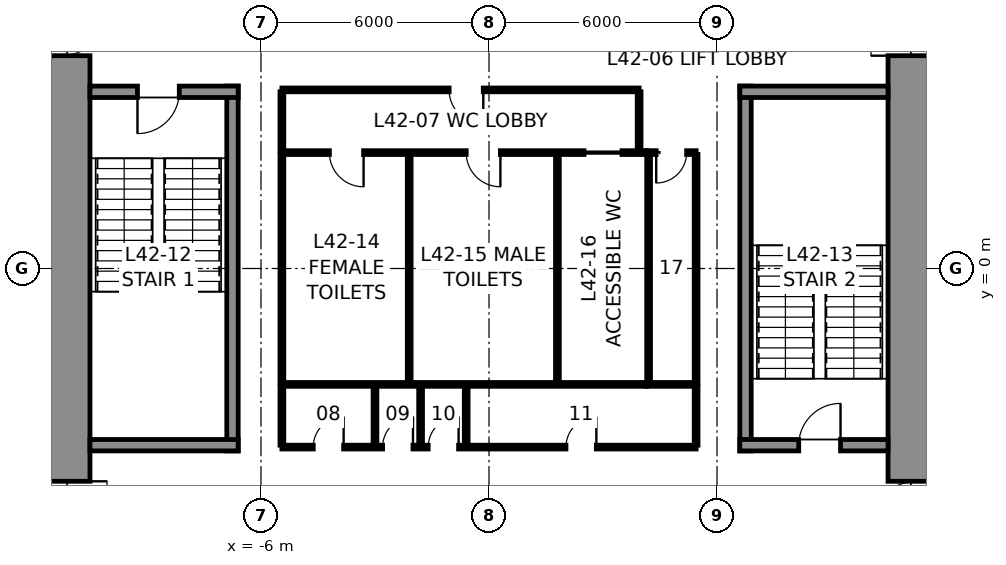
"""IFC4 building model, lengths in metres.
Left out: names, types, materials, properties, quantities, classifications, styles, units other than length and angle.
Written with IfcOpenShell. Run it as: python <this file> out.ifc"""

import sys

from ifc_helpers import new_model, si_unit, direction, frame, frame_2d, origin, place, context, subcontext, project, spatial, rectangle, extrude, element, fill, save


model = new_model("IFC4")
c1 = context("Model", 3, precision=1e-05, world=origin(), true_north=direction((0.0, 1.0)))
c2 = subcontext(c1, "Body", "Model", "MODEL_VIEW")
j1 = project(units=[si_unit("LENGTHUNIT", "METRE"), si_unit("PLANEANGLEUNIT", "RADIAN")], contexts=[c1])
p1 = place(None, origin())
s1 = spatial("IfcSite", under=j1, at=p1, CompositionType="ELEMENT")
p2 = place(p1, origin())
s2 = spatial("IfcBuilding", under=s1, at=p2, CompositionType="ELEMENT")
p3 = place(p2, frame((0.0, 0.0, 196.8)))
s3 = spatial("IfcBuildingStorey", under=s2, at=p3, CompositionType="ELEMENT", Elevation=196.8)
p4 = place(p3, frame((11.25, 10.5, 0.0), z_axis=(0.0, 0.0, 1.0), x_axis=(0.0, -1.0, 0.0)))
e1 = element("IfcWall", 1, at=p4, inside=s3, PredefinedType="SHEAR", context=c2, shape_type="SweptSolid", body=[
    extrude(rectangle(XDim=21.0, YDim=1.5, at=frame_2d((10.5, 0.0))), origin(), (0.0, 0.0, 1.0), 5.0),
])
p5 = place(p4, frame((3.7, 0.0, 0.0)))
e2 = element("IfcOpeningElement", 2, at=p5, cuts=e1, PredefinedType="OPENING", context=c2, shape_type="SweptSolid", body=[
    extrude(rectangle(XDim=1.2, YDim=2.3, at=frame_2d((0.6, 1.15))), frame((0.0, 0.76, 0.0), z_axis=(0.0, -1.0, 0.0), x_axis=(1.0, 0.0, 0.0)), (0.0, 0.0, 1.0), 1.52),
])
p6 = place(p4, frame((16.1, 0.0, 0.0)))
e3 = element("IfcOpeningElement", 3, at=p6, cuts=e1, PredefinedType="OPENING", context=c2, shape_type="SweptSolid", body=[
    extrude(rectangle(XDim=1.2, YDim=2.3, at=frame_2d((0.6, 1.15))), frame((0.0, 0.76, 0.0), z_axis=(0.0, -1.0, 0.0), x_axis=(1.0, 0.0, 0.0)), (0.0, 0.0, 1.0), 1.52),
])
p7 = place(p3, frame((-11.25, -10.5, 0.0), z_axis=(0.0, 0.0, 1.0), x_axis=(0.0, 1.0, 0.0)))
e4 = element("IfcWall", 4, at=p7, inside=s3, PredefinedType="SHEAR", context=c2, shape_type="SweptSolid", body=[
    extrude(rectangle(XDim=21.0, YDim=1.5, at=frame_2d((10.5, 0.0))), origin(), (0.0, 0.0, 1.0), 5.0),
])
p8 = place(p7, frame((16.1, 0.0, 0.0)))
e5 = element("IfcOpeningElement", 5, at=p8, cuts=e4, PredefinedType="OPENING", context=c2, shape_type="SweptSolid", body=[
    extrude(rectangle(XDim=1.2, YDim=2.3, at=frame_2d((0.6, 1.15))), frame((0.0, 0.76, 0.0), z_axis=(0.0, -1.0, 0.0), x_axis=(1.0, 0.0, 0.0)), (0.0, 0.0, 1.0), 1.52),
])
p9 = place(p7, frame((3.7, 0.0, 0.0)))
e6 = element("IfcOpeningElement", 6, at=p9, cuts=e4, PredefinedType="OPENING", context=c2, shape_type="SweptSolid", body=[
    extrude(rectangle(XDim=1.2, YDim=2.3, at=frame_2d((0.6, 1.15))), frame((0.0, 0.76, 0.0), z_axis=(0.0, -1.0, 0.0), x_axis=(1.0, 0.0, 0.0)), (0.0, 0.0, 1.0), 1.52),
])
p10 = place(p3, frame((-6.75, -4.8, 0.0), z_axis=(0.0, 0.0, 1.0), x_axis=(0.0, 1.0, 0.0)))
e7 = element("IfcWall", 7, at=p10, inside=s3, PredefinedType="SOLIDWALL", context=c2, shape_type="SweptSolid", body=[
    extrude(rectangle(XDim=9.6, YDim=0.3, at=frame_2d((4.8, 0.0))), origin(), (0.0, 0.0, 1.0), 4.75),
])
p11 = place(p3, frame((-10.5, 4.65, 0.0), z_axis=(0.0, 0.0, 1.0), x_axis=(1.0, 0.0, 0.0)))
e8 = element("IfcWall", 8, at=p11, inside=s3, PredefinedType="SOLIDWALL", context=c2, shape_type="SweptSolid", body=[
    extrude(rectangle(XDim=3.9, YDim=0.3, at=frame_2d((1.95, 0.0))), origin(), (0.0, 0.0, 1.0), 4.75),
])
p12 = place(p11, frame((1.25, 0.0, 0.0)))
e9 = element("IfcOpeningElement", 9, at=p12, cuts=e8, PredefinedType="OPENING", context=c2, shape_type="SweptSolid", body=[
    extrude(rectangle(XDim=1.1, YDim=2.3, at=frame_2d((0.55, 1.15))), frame((0.0, 0.16, 0.0), z_axis=(0.0, -1.0, 0.0), x_axis=(1.0, 0.0, 0.0)), (0.0, 0.0, 1.0), 0.32),
])
p13 = place(p3, frame((-6.6, -4.65, 0.0), z_axis=(0.0, 0.0, 1.0), x_axis=(-1.0, 0.0, 0.0)))
e10 = element("IfcWall", 10, at=p13, inside=s3, PredefinedType="SOLIDWALL", context=c2, shape_type="SweptSolid", body=[
    extrude(rectangle(XDim=3.9, YDim=0.3, at=frame_2d((1.95, 0.0))), origin(), (0.0, 0.0, 1.0), 4.75),
])
p14 = place(p3, frame((6.75, -4.8, 0.0), z_axis=(0.0, 0.0, 1.0), x_axis=(0.0, 1.0, 0.0)))
e11 = element("IfcWall", 11, at=p14, inside=s3, PredefinedType="SOLIDWALL", context=c2, shape_type="SweptSolid", body=[
    extrude(rectangle(XDim=9.6, YDim=0.3, at=frame_2d((4.8, 0.0))), origin(), (0.0, 0.0, 1.0), 4.75),
])
p15 = place(p3, frame((6.6, 4.65, 0.0), z_axis=(0.0, 0.0, 1.0), x_axis=(1.0, 0.0, 0.0)))
e12 = element("IfcWall", 12, at=p15, inside=s3, PredefinedType="SOLIDWALL", context=c2, shape_type="SweptSolid", body=[
    extrude(rectangle(XDim=3.9, YDim=0.3, at=frame_2d((1.95, 0.0))), origin(), (0.0, 0.0, 1.0), 4.75),
])
p16 = place(p3, frame((10.5, -4.65, 0.0), z_axis=(0.0, 0.0, 1.0), x_axis=(-1.0, 0.0, 0.0)))
e13 = element("IfcWall", 13, at=p16, inside=s3, PredefinedType="SOLIDWALL", context=c2, shape_type="SweptSolid", body=[
    extrude(rectangle(XDim=3.9, YDim=0.3, at=frame_2d((1.95, 0.0))), origin(), (0.0, 0.0, 1.0), 4.75),
])
p17 = place(p16, frame((1.25, 0.0, 0.0)))
e14 = element("IfcOpeningElement", 14, at=p17, cuts=e13, PredefinedType="OPENING", context=c2, shape_type="SweptSolid", body=[
    extrude(rectangle(XDim=1.1, YDim=2.3, at=frame_2d((0.55, 1.15))), frame((0.0, 0.16, 0.0), z_axis=(0.0, -1.0, 0.0), x_axis=(1.0, 0.0, 0.0)), (0.0, 0.0, 1.0), 0.32),
])
p18 = place(p3, frame((-5.45, 3.05, 0.0), z_axis=(0.0, 0.0, 1.0), x_axis=(1.0, 0.0, 0.0)))
e15 = element("IfcWall", 15, at=p18, inside=s3, PredefinedType="PARTITIONING", context=c2, shape_type="SweptSolid", body=[
    extrude(rectangle(XDim=9.6, YDim=0.1, at=frame_2d((4.8, 0.0))), origin(), (0.0, 0.0, 1.0), 4.75),
])
p19 = place(p18, frame((1.25, 0.0, 0.0)))
e16 = element("IfcOpeningElement", 16, at=p19, cuts=e15, PredefinedType="OPENING", context=c2, shape_type="SweptSolid", body=[
    extrude(rectangle(XDim=0.9, YDim=2.3, at=frame_2d((0.45, 1.15))), frame((0.0, 0.06, 0.0), z_axis=(0.0, -1.0, 0.0), x_axis=(1.0, 0.0, 0.0)), (0.0, 0.0, 1.0), 0.12),
])
p20 = place(p18, frame((4.85, 0.0, 0.0)))
e17 = element("IfcOpeningElement", 17, at=p20, cuts=e15, PredefinedType="OPENING", context=c2, shape_type="SweptSolid", body=[
    extrude(rectangle(XDim=0.9, YDim=2.3, at=frame_2d((0.45, 1.15))), frame((0.0, 0.06, 0.0), z_axis=(0.0, -1.0, 0.0), x_axis=(1.0, 0.0, 0.0)), (0.0, 0.0, 1.0), 0.12),
])
p21 = place(p18, frame((7.95, 0.0, 0.0)))
e18 = element("IfcOpeningElement", 18, at=p21, cuts=e15, PredefinedType="OPENING", context=c2, shape_type="SweptSolid", body=[
    extrude(rectangle(XDim=1.0, YDim=2.3, at=frame_2d((0.5, 1.15))), frame((0.0, 0.06, 0.0), z_axis=(0.0, -1.0, 0.0), x_axis=(1.0, 0.0, 0.0)), (0.0, 0.0, 1.0), 0.12),
])
p22 = place(p3, frame((4.15, 3.05, 0.0), z_axis=(0.0, 0.0, 1.0), x_axis=(1.0, 0.0, 0.0)))
e19 = element("IfcWall", 19, at=p22, inside=s3, PredefinedType="PARTITIONING", context=c2, shape_type="SweptSolid", body=[
    extrude(rectangle(XDim=1.3, YDim=0.1, at=frame_2d((0.65, 0.0))), origin(), (0.0, 0.0, 1.0), 4.75),
])
p23 = place(p22, frame((0.25, 0.0, 0.0)))
e20 = element("IfcOpeningElement", 20, at=p23, cuts=e19, PredefinedType="OPENING", context=c2, shape_type="SweptSolid", body=[
    extrude(rectangle(XDim=0.8, YDim=2.3, at=frame_2d((0.4, 1.15))), frame((0.0, 0.06, 0.0), z_axis=(0.0, -1.0, 0.0), x_axis=(1.0, 0.0, 0.0)), (0.0, 0.0, 1.0), 0.12),
])
p24 = place(p3, frame((4.15, -3.05, 0.0), z_axis=(0.0, 0.0, 1.0), x_axis=(-1.0, 0.0, 0.0)))
e21 = element("IfcWall", 21, at=p24, inside=s3, PredefinedType="PARTITIONING", context=c2, shape_type="SweptSolid", body=[
    extrude(rectangle(XDim=9.6, YDim=0.1, at=frame_2d((4.8, 0.0))), origin(), (0.0, 0.0, 1.0), 4.75),
])
p25 = place(p3, frame((5.45, -3.05, 0.0), z_axis=(0.0, 0.0, 1.0), x_axis=(-1.0, 0.0, 0.0)))
e22 = element("IfcWall", 22, at=p25, inside=s3, PredefinedType="PARTITIONING", context=c2, shape_type="SweptSolid", body=[
    extrude(rectangle(XDim=1.3, YDim=0.1, at=frame_2d((0.65, 0.0))), origin(), (0.0, 0.0, 1.0), 4.75),
])
for number, where, z_axis, x_axis in (
    (23, (5.45, 3.0, 0.0), (0.0, 0.0, 1.0), (0.0, -1.0, 0.0)),
    (24, (-5.45, -3.0, 0.0), (0.0, 0.0, 1.0), (0.0, 1.0, 0.0)),
    (25, (-2.1, -3.0, 0.0), (0.0, 0.0, 1.0), (0.0, 1.0, 0.0)),
    (26, (1.8, -3.0, 0.0), (0.0, 0.0, 1.0), (0.0, 1.0, 0.0)),
    (27, (4.2, -3.0, 0.0), (0.0, 0.0, 1.0), (0.0, 1.0, 0.0)),
):
    element("IfcWall", number, at=place(p3, frame(where, z_axis=z_axis, x_axis=x_axis)), inside=s3, PredefinedType="PARTITIONING", context=c2, shape_type="SweptSolid", body=[
        extrude(rectangle(XDim=6.0, YDim=0.1, at=frame_2d((3.0, 0.0))), origin(), (0.0, 0.0, 1.0), 4.75),
    ])
p26 = place(p3, frame((-5.45, 4.7, 0.0), z_axis=(0.0, 0.0, 1.0), x_axis=(1.0, 0.0, 0.0)))
e28 = element("IfcWall", 28, at=p26, inside=s3, PredefinedType="PARTITIONING", context=c2, shape_type="SweptSolid", body=[
    extrude(rectangle(XDim=9.4, YDim=0.1, at=frame_2d((4.7, 0.0))), origin(), (0.0, 0.0, 1.0), 4.75),
])
p27 = place(p26, frame((4.4, 0.0, 0.0)))
e29 = element("IfcOpeningElement", 29, at=p27, cuts=e28, PredefinedType="OPENING", context=c2, shape_type="SweptSolid", body=[
    extrude(rectangle(XDim=0.9, YDim=2.3, at=frame_2d((0.45, 1.15))), frame((0.0, 0.06, 0.0), z_axis=(0.0, -1.0, 0.0), x_axis=(1.0, 0.0, 0.0)), (0.0, 0.0, 1.0), 0.12),
])
for number, where, z_axis, x_axis in (
    (30, (-5.45, 3.1, 0.0), (0.0, 0.0, 1.0), (0.0, 1.0, 0.0)),
    (31, (3.95, 3.1, 0.0), (0.0, 0.0, 1.0), (0.0, 1.0, 0.0)),
):
    element("IfcWall", number, at=place(p3, frame(where, z_axis=z_axis, x_axis=x_axis)), inside=s3, PredefinedType="PARTITIONING", context=c2, shape_type="SweptSolid", body=[
        extrude(rectangle(XDim=1.55, YDim=0.1, at=frame_2d((0.775, 0.0))), origin(), (0.0, 0.0, 1.0), 4.75),
    ])
p28 = place(p3, frame((5.45, -4.7, 0.0), z_axis=(0.0, 0.0, 1.0), x_axis=(-1.0, 0.0, 0.0)))
e32 = element("IfcWall", 32, at=p28, inside=s3, PredefinedType="PARTITIONING", context=c2, shape_type="SweptSolid", body=[
    extrude(rectangle(XDim=10.9, YDim=0.1, at=frame_2d((5.45, 0.0))), origin(), (0.0, 0.0, 1.0), 4.75),
])
p29 = place(p28, frame((9.275, 0.0, 0.0)))
e33 = element("IfcOpeningElement", 33, at=p29, cuts=e32, PredefinedType="OPENING", context=c2, shape_type="SweptSolid", body=[
    extrude(rectangle(XDim=0.8, YDim=2.3, at=frame_2d((0.4, 1.15))), frame((0.0, 0.06, 0.0), z_axis=(0.0, -1.0, 0.0), x_axis=(1.0, 0.0, 0.0)), (0.0, 0.0, 1.0), 0.12),
])
p30 = place(p28, frame((7.45, 0.0, 0.0)))
e34 = element("IfcOpeningElement", 34, at=p30, cuts=e32, PredefinedType="OPENING", context=c2, shape_type="SweptSolid", body=[
    extrude(rectangle(XDim=0.8, YDim=2.3, at=frame_2d((0.4, 1.15))), frame((0.0, 0.06, 0.0), z_axis=(0.0, -1.0, 0.0), x_axis=(1.0, 0.0, 0.0)), (0.0, 0.0, 1.0), 0.12),
])
p31 = place(p28, frame((6.25, 0.0, 0.0)))
e35 = element("IfcOpeningElement", 35, at=p31, cuts=e32, PredefinedType="OPENING", context=c2, shape_type="SweptSolid", body=[
    extrude(rectangle(XDim=0.8, YDim=2.3, at=frame_2d((0.4, 1.15))), frame((0.0, 0.06, 0.0), z_axis=(0.0, -1.0, 0.0), x_axis=(1.0, 0.0, 0.0)), (0.0, 0.0, 1.0), 0.12),
])
p32 = place(p28, frame((2.625, 0.0, 0.0)))
e36 = element("IfcOpeningElement", 36, at=p32, cuts=e32, PredefinedType="OPENING", context=c2, shape_type="SweptSolid", body=[
    extrude(rectangle(XDim=0.8, YDim=2.3, at=frame_2d((0.4, 1.15))), frame((0.0, 0.06, 0.0), z_axis=(0.0, -1.0, 0.0), x_axis=(1.0, 0.0, 0.0)), (0.0, 0.0, 1.0), 0.12),
])
for number, where, z_axis, x_axis in (
    (37, (-5.45, -3.1, 0.0), (0.0, 0.0, 1.0), (0.0, -1.0, 0.0)),
    (38, (5.45, -3.1, 0.0), (0.0, 0.0, 1.0), (0.0, -1.0, 0.0)),
    (39, (-3.0, -3.1, 0.0), (0.0, 0.0, 1.0), (0.0, -1.0, 0.0)),
    (40, (-1.8, -3.1, 0.0), (0.0, 0.0, 1.0), (0.0, -1.0, 0.0)),
    (41, (-0.6, -3.1, 0.0), (0.0, 0.0, 1.0), (0.0, -1.0, 0.0)),
):
    element("IfcWall", number, at=place(p3, frame(where, z_axis=z_axis, x_axis=x_axis)), inside=s3, PredefinedType="PARTITIONING", context=c2, shape_type="SweptSolid", body=[
        extrude(rectangle(XDim=1.55, YDim=0.1, at=frame_2d((0.775, 0.0))), origin(), (0.0, 0.0, 1.0), 4.75),
    ])
p33 = place(p12, frame((1.1, 0.0, 0.0), z_axis=(0.0, 0.0, 1.0), x_axis=(-1.0, 0.0, 0.0)))
e42 = element("IfcDoor", 42, at=p33, inside=s3, OperationType="SINGLE_SWING_RIGHT", PredefinedType="DOOR", context=c2, shape_type="SweptSolid", body=[
    extrude(rectangle(XDim=1.1, YDim=2.3, at=frame_2d((0.55, 1.15))), frame((0.0, 0.025, 0.0), z_axis=(0.0, -1.0, 0.0), x_axis=(1.0, 0.0, 0.0)), (0.0, 0.0, 1.0), 0.05),
])
fill(e9, e42)
p34 = place(p17, frame((1.1, 0.0, 0.0), z_axis=(0.0, 0.0, 1.0), x_axis=(-1.0, 0.0, 0.0)))
e43 = element("IfcDoor", 43, at=p34, inside=s3, OperationType="SINGLE_SWING_RIGHT", PredefinedType="DOOR", context=c2, shape_type="SweptSolid", body=[
    extrude(rectangle(XDim=1.1, YDim=2.3, at=frame_2d((0.55, 1.15))), frame((0.0, 0.025, 0.0), z_axis=(0.0, -1.0, 0.0), x_axis=(1.0, 0.0, 0.0)), (0.0, 0.0, 1.0), 0.05),
])
fill(e14, e43)
p35 = place(p19, frame((0.9, 0.0, 0.0), z_axis=(0.0, 0.0, 1.0), x_axis=(-1.0, 0.0, 0.0)))
e44 = element("IfcDoor", 44, at=p35, inside=s3, OperationType="SINGLE_SWING_LEFT", PredefinedType="DOOR", context=c2, shape_type="SweptSolid", body=[
    extrude(rectangle(XDim=0.9, YDim=2.3, at=frame_2d((0.45, 1.15))), frame((0.0, 0.025, 0.0), z_axis=(0.0, -1.0, 0.0), x_axis=(1.0, 0.0, 0.0)), (0.0, 0.0, 1.0), 0.05),
])
fill(e16, e44)
p36 = place(p20, frame((0.9, 0.0, 0.0), z_axis=(0.0, 0.0, 1.0), x_axis=(-1.0, 0.0, 0.0)))
e45 = element("IfcDoor", 45, at=p36, inside=s3, OperationType="SINGLE_SWING_LEFT", PredefinedType="DOOR", context=c2, shape_type="SweptSolid", body=[
    extrude(rectangle(XDim=0.9, YDim=2.3, at=frame_2d((0.45, 1.15))), frame((0.0, 0.025, 0.0), z_axis=(0.0, -1.0, 0.0), x_axis=(1.0, 0.0, 0.0)), (0.0, 0.0, 1.0), 0.05),
])
fill(e17, e45)
p37 = place(p21, frame((1.0, 0.0, 0.0), z_axis=(0.0, 0.0, 1.0), x_axis=(-1.0, 0.0, 0.0)))
e46 = element("IfcDoor", 46, at=p37, inside=s3, OperationType="SLIDING_TO_LEFT", PredefinedType="DOOR", context=c2, shape_type="SweptSolid", body=[
    extrude(rectangle(XDim=1.0, YDim=2.3, at=frame_2d((0.5, 1.15))), frame((0.0, 0.025, 0.0), z_axis=(0.0, -1.0, 0.0), x_axis=(1.0, 0.0, 0.0)), (0.0, 0.0, 1.0), 0.05),
])
fill(e18, e46)
p38 = place(p23, frame((0.8, 0.0, 0.0), z_axis=(0.0, 0.0, 1.0), x_axis=(-1.0, 0.0, 0.0)))
e47 = element("IfcDoor", 47, at=p38, inside=s3, OperationType="SINGLE_SWING_RIGHT", PredefinedType="DOOR", context=c2, shape_type="SweptSolid", body=[
    extrude(rectangle(XDim=0.8, YDim=2.3, at=frame_2d((0.4, 1.15))), frame((0.0, 0.025, 0.0), z_axis=(0.0, -1.0, 0.0), x_axis=(1.0, 0.0, 0.0)), (0.0, 0.0, 1.0), 0.05),
])
fill(e20, e47)
p39 = place(p27, frame((0.9, 0.0, 0.0), z_axis=(0.0, 0.0, 1.0), x_axis=(-1.0, 0.0, 0.0)))
e48 = element("IfcDoor", 48, at=p39, inside=s3, OperationType="SINGLE_SWING_LEFT", PredefinedType="DOOR", context=c2, shape_type="SweptSolid", body=[
    extrude(rectangle(XDim=0.9, YDim=2.3, at=frame_2d((0.45, 1.15))), frame((0.0, 0.025, 0.0), z_axis=(0.0, -1.0, 0.0), x_axis=(1.0, 0.0, 0.0)), (0.0, 0.0, 1.0), 0.05),
])
fill(e29, e48)
p40 = place(p29, frame((0.8, 0.0, 0.0), z_axis=(0.0, 0.0, 1.0), x_axis=(-1.0, 0.0, 0.0)))
e49 = element("IfcDoor", 49, at=p40, inside=s3, OperationType="SINGLE_SWING_RIGHT", PredefinedType="DOOR", context=c2, shape_type="SweptSolid", body=[
    extrude(rectangle(XDim=0.8, YDim=2.3, at=frame_2d((0.4, 1.15))), frame((0.0, 0.025, 0.0), z_axis=(0.0, -1.0, 0.0), x_axis=(1.0, 0.0, 0.0)), (0.0, 0.0, 1.0), 0.05),
])
fill(e33, e49)
p41 = place(p30, frame((0.8, 0.0, 0.0), z_axis=(0.0, 0.0, 1.0), x_axis=(-1.0, 0.0, 0.0)))
e50 = element("IfcDoor", 50, at=p41, inside=s3, OperationType="SINGLE_SWING_RIGHT", PredefinedType="DOOR", context=c2, shape_type="SweptSolid", body=[
    extrude(rectangle(XDim=0.8, YDim=2.3, at=frame_2d((0.4, 1.15))), frame((0.0, 0.025, 0.0), z_axis=(0.0, -1.0, 0.0), x_axis=(1.0, 0.0, 0.0)), (0.0, 0.0, 1.0), 0.05),
])
fill(e34, e50)
p42 = place(p31, frame((0.8, 0.0, 0.0), z_axis=(0.0, 0.0, 1.0), x_axis=(-1.0, 0.0, 0.0)))
e51 = element("IfcDoor", 51, at=p42, inside=s3, OperationType="SINGLE_SWING_RIGHT", PredefinedType="DOOR", context=c2, shape_type="SweptSolid", body=[
    extrude(rectangle(XDim=0.8, YDim=2.3, at=frame_2d((0.4, 1.15))), frame((0.0, 0.025, 0.0), z_axis=(0.0, -1.0, 0.0), x_axis=(1.0, 0.0, 0.0)), (0.0, 0.0, 1.0), 0.05),
])
fill(e35, e51)
p43 = place(p32, frame((0.8, 0.0, 0.0), z_axis=(0.0, 0.0, 1.0), x_axis=(-1.0, 0.0, 0.0)))
e52 = element("IfcDoor", 52, at=p43, inside=s3, OperationType="SINGLE_SWING_RIGHT", PredefinedType="DOOR", context=c2, shape_type="SweptSolid", body=[
    extrude(rectangle(XDim=0.8, YDim=2.3, at=frame_2d((0.4, 1.15))), frame((0.0, 0.025, 0.0), z_axis=(0.0, -1.0, 0.0), x_axis=(1.0, 0.0, 0.0)), (0.0, 0.0, 1.0), 0.05),
])
fill(e36, e52)
p44 = place(p8, frame((1.2, 0.0, 0.0), z_axis=(0.0, 0.0, 1.0), x_axis=(-1.0, 0.0, 0.0)))
e53 = element("IfcDoor", 53, at=p44, inside=s3, OperationType="SINGLE_SWING_LEFT", PredefinedType="DOOR", context=c2, shape_type="SweptSolid", body=[
    extrude(rectangle(XDim=1.2, YDim=2.3, at=frame_2d((0.6, 1.15))), frame((0.0, 0.025, 0.0), z_axis=(0.0, -1.0, 0.0), x_axis=(1.0, 0.0, 0.0)), (0.0, 0.0, 1.0), 0.05),
])
fill(e5, e53)
p45 = place(p9, frame((1.2, 0.0, 0.0), z_axis=(0.0, 0.0, 1.0), x_axis=(-1.0, 0.0, 0.0)))
e54 = element("IfcDoor", 54, at=p45, inside=s3, OperationType="SINGLE_SWING_LEFT", PredefinedType="DOOR", context=c2, shape_type="SweptSolid", body=[
    extrude(rectangle(XDim=1.2, YDim=2.3, at=frame_2d((0.6, 1.15))), frame((0.0, 0.025, 0.0), z_axis=(0.0, -1.0, 0.0), x_axis=(1.0, 0.0, 0.0)), (0.0, 0.0, 1.0), 0.05),
])
fill(e6, e54)
p46 = place(p5, frame((1.2, 0.0, 0.0), z_axis=(0.0, 0.0, 1.0), x_axis=(-1.0, 0.0, 0.0)))
e55 = element("IfcDoor", 55, at=p46, inside=s3, OperationType="SINGLE_SWING_LEFT", PredefinedType="DOOR", context=c2, shape_type="SweptSolid", body=[
    extrude(rectangle(XDim=1.2, YDim=2.3, at=frame_2d((0.6, 1.15))), frame((0.0, 0.025, 0.0), z_axis=(0.0, -1.0, 0.0), x_axis=(1.0, 0.0, 0.0)), (0.0, 0.0, 1.0), 0.05),
])
fill(e2, e55)
p47 = place(p6, frame((1.2, 0.0, 0.0), z_axis=(0.0, 0.0, 1.0), x_axis=(-1.0, 0.0, 0.0)))
e56 = element("IfcDoor", 56, at=p47, inside=s3, OperationType="SINGLE_SWING_LEFT", PredefinedType="DOOR", context=c2, shape_type="SweptSolid", body=[
    extrude(rectangle(XDim=1.2, YDim=2.3, at=frame_2d((0.6, 1.15))), frame((0.0, 0.025, 0.0), z_axis=(0.0, -1.0, 0.0), x_axis=(1.0, 0.0, 0.0)), (0.0, 0.0, 1.0), 0.05),
])
fill(e3, e56)
save(model, sys.argv[1])
